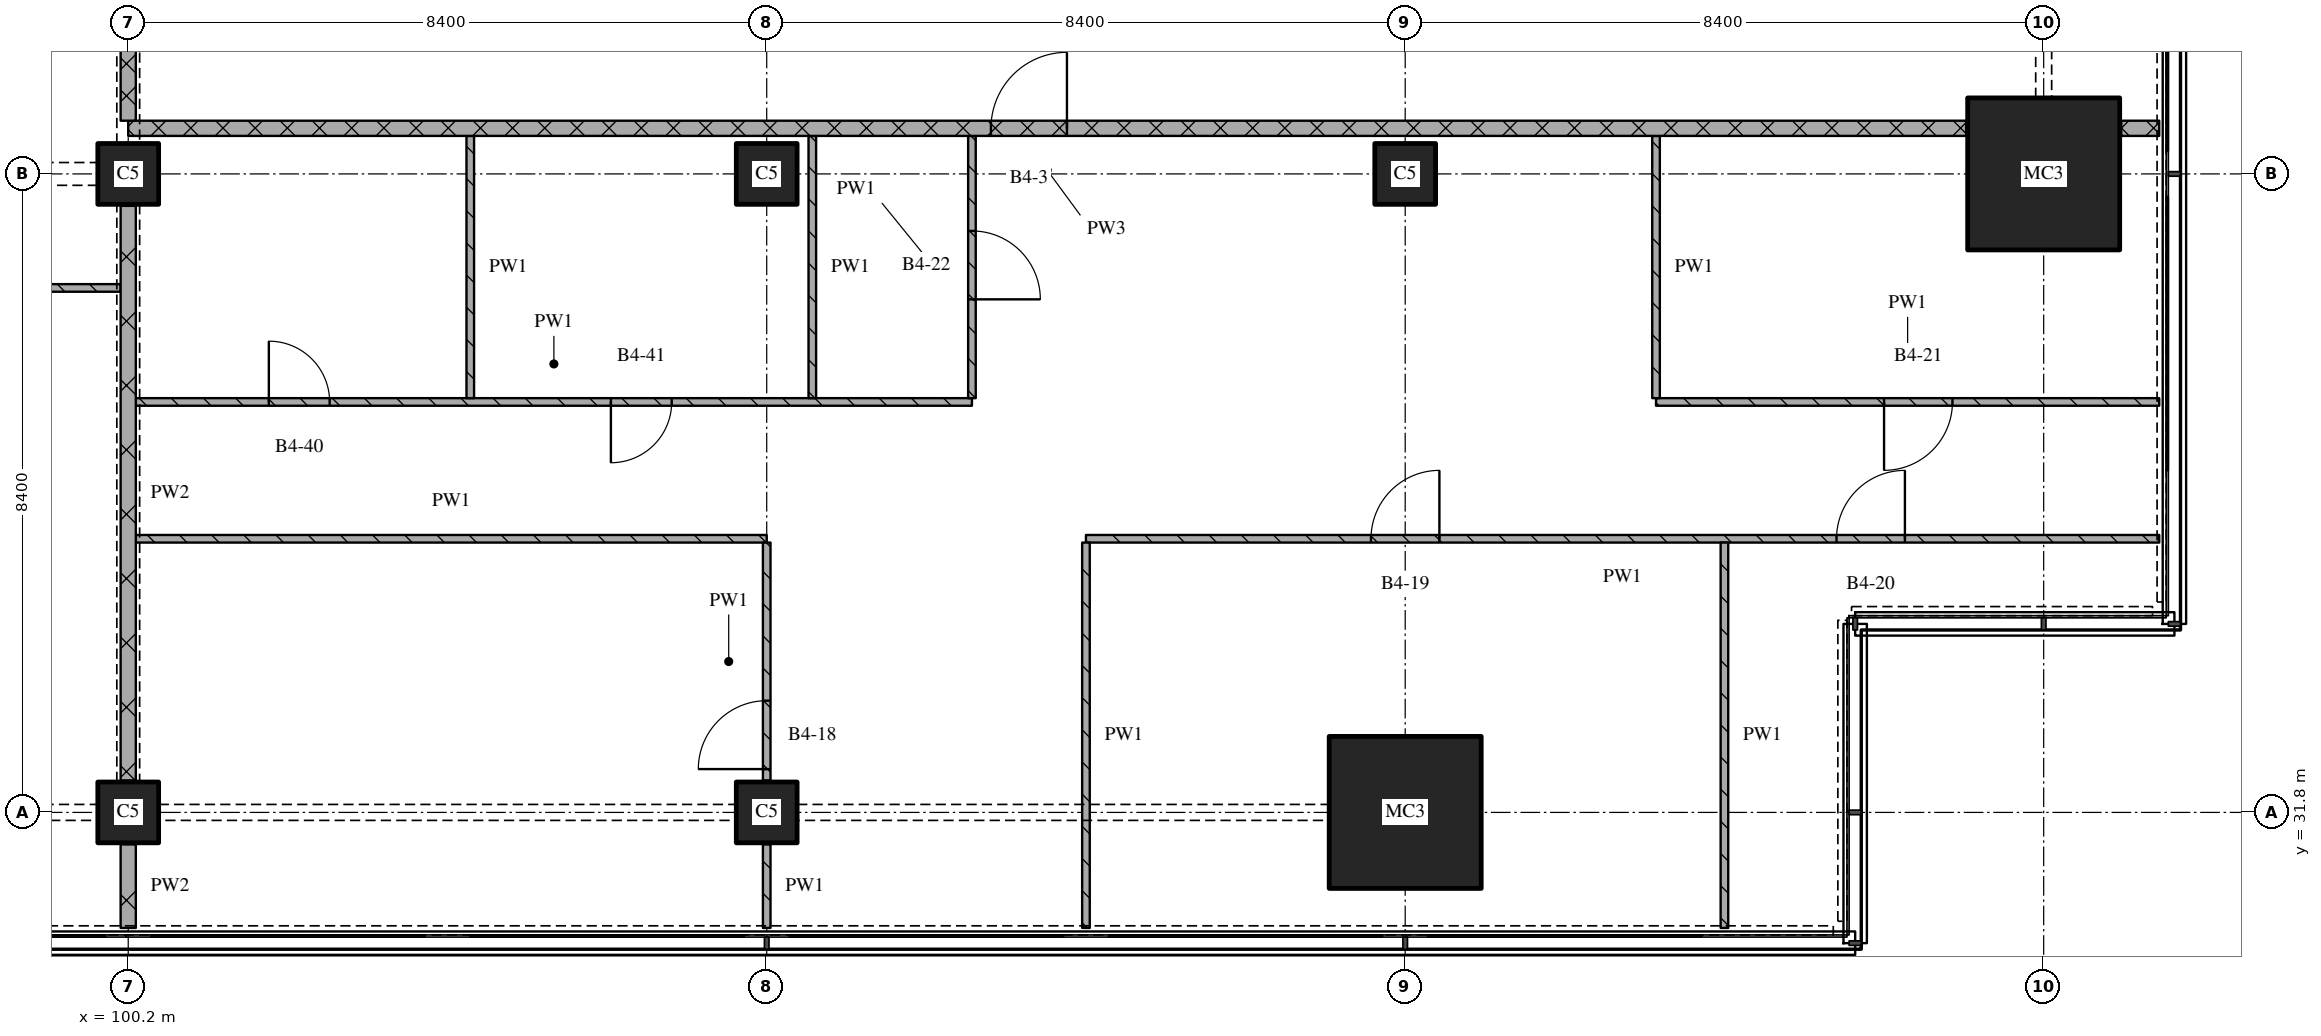
"""IFC4 building model, lengths in metres.
Left out: names, types, materials, properties, quantities, classifications, styles, units other than length and angle.
Written with IfcOpenShell. Run it as: python <this file> out.ifc"""

import sys

from ifc_helpers import new_model, si_unit, direction, frame, frame_2d, origin, origin_2d, place, context, subcontext, project, spatial, rectangle, extrude, element, fill, save


model = new_model("IFC4")
c1 = context("Model", 3, precision=1e-05, world=origin(), true_north=direction((0.0, 1.0)))
c2 = subcontext(c1, "Body", "Model", "MODEL_VIEW")
j1 = project(units=[si_unit("LENGTHUNIT", "METRE"), si_unit("PLANEANGLEUNIT", "RADIAN")], contexts=[c1])
p1 = place(None, origin())
s1 = spatial("IfcSite", under=j1, at=p1, CompositionType="ELEMENT")
p2 = place(p1, origin())
s2 = spatial("IfcBuilding", under=s1, at=p2, CompositionType="ELEMENT")
p3 = place(p2, frame((0.0, 0.0, 131.25)))
s3 = spatial("IfcBuildingStorey", under=s2, at=p3, CompositionType="ELEMENT", Elevation=131.25)
for number, where, z_axis, x_axis in (
    (1, (100.2, 31.8, 0.0), (0.0, 0.0, 1.0), (1.0, 0.0, 0.0)),
    (2, (100.2, 40.2, 0.0), (0.0, 0.0, 1.0), (1.0, 0.0, 0.0)),
    (3, (108.6, 31.8, 0.0), (0.0, 0.0, 1.0), (1.0, 0.0, 0.0)),
    (4, (108.6, 40.2, 0.0), (0.0, 0.0, 1.0), (1.0, 0.0, 0.0)),
):
    element("IfcColumn", number, at=place(p3, frame(where, z_axis=z_axis, x_axis=x_axis)), inside=s3, PredefinedType="COLUMN", context=c2, shape_type="SweptSolid", body=[
        extrude(rectangle(XDim=0.8, YDim=0.8, at=origin_2d()), origin(), (0.0, 0.0, 1.0), 3.6),
    ])
p4 = place(p3, frame((117.0, 31.8, 0.0), z_axis=(0.0, 0.0, 1.0), x_axis=(1.0, 0.0, 0.0)))
e5 = element("IfcColumn", 5, at=p4, inside=s3, PredefinedType="COLUMN", context=c2, shape_type="SweptSolid", body=[
    extrude(rectangle(XDim=2.0, YDim=2.0, at=origin_2d()), origin(), (0.0, 0.0, 1.0), 3.6),
])
p5 = place(p3, frame((117.0, 40.2, 0.0), z_axis=(0.0, 0.0, 1.0), x_axis=(1.0, 0.0, 0.0)))
e6 = element("IfcColumn", 6, at=p5, inside=s3, PredefinedType="COLUMN", context=c2, shape_type="SweptSolid", body=[
    extrude(rectangle(XDim=0.8, YDim=0.8, at=origin_2d()), origin(), (0.0, 0.0, 1.0), 3.6),
])
p6 = place(p3, frame((125.4, 40.2, 0.0), z_axis=(0.0, 0.0, 1.0), x_axis=(1.0, 0.0, 0.0)))
e7 = element("IfcColumn", 7, at=p6, inside=s3, PredefinedType="COLUMN", context=c2, shape_type="SweptSolid", body=[
    extrude(rectangle(XDim=2.0, YDim=2.0, at=origin_2d()), origin(), (0.0, 0.0, 1.0), 3.6),
])
p7 = place(p3, frame((100.3, 35.4, 0.0), z_axis=(0.0, 0.0, 1.0), x_axis=(1.0, 0.0, 0.0)))
e8 = element("IfcWall", 8, at=p7, inside=s3, PredefinedType="PARTITIONING", context=c2, shape_type="SweptSolid", body=[
    extrude(rectangle(XDim=8.3, YDim=0.1, at=frame_2d((4.15, 0.0))), origin(), (0.0, 0.0, 1.0), 3.32),
])
p8 = place(p3, frame((126.92, 35.4, 0.0), z_axis=(0.0, 0.0, 1.0), x_axis=(-1.0, 0.0, 0.0)))
e9 = element("IfcWall", 9, at=p8, inside=s3, PredefinedType="PARTITIONING", context=c2, shape_type="SweptSolid", body=[
    extrude(rectangle(XDim=14.12, YDim=0.1, at=frame_2d((7.06, 0.0))), origin(), (0.0, 0.0, 1.0), 3.32),
])
p9 = place(p8, frame((3.346, 0.0, 0.0)))
e10 = element("IfcOpeningElement", 10, at=p9, cuts=e9, PredefinedType="OPENING", context=c2, shape_type="SweptSolid", body=[
    extrude(rectangle(XDim=0.9, YDim=2.1, at=frame_2d((0.45, 1.05))), frame((0.0, 0.06, 0.0), z_axis=(0.0, -1.0, 0.0), x_axis=(1.0, 0.0, 0.0)), (0.0, 0.0, 1.0), 0.12),
])
p10 = place(p8, frame((9.47, 0.0, 0.0)))
e11 = element("IfcOpeningElement", 11, at=p10, cuts=e9, PredefinedType="OPENING", context=c2, shape_type="SweptSolid", body=[
    extrude(rectangle(XDim=0.9, YDim=2.1, at=frame_2d((0.45, 1.05))), frame((0.0, 0.06, 0.0), z_axis=(0.0, -1.0, 0.0), x_axis=(1.0, 0.0, 0.0)), (0.0, 0.0, 1.0), 0.12),
])
p11 = place(p3, frame((100.3, 37.2, 0.0), z_axis=(0.0, 0.0, 1.0), x_axis=(1.0, 0.0, 0.0)))
e12 = element("IfcWall", 12, at=p11, inside=s3, PredefinedType="PARTITIONING", context=c2, shape_type="SweptSolid", body=[
    extrude(rectangle(XDim=11.0, YDim=0.1, at=frame_2d((5.5, 0.0))), origin(), (0.0, 0.0, 1.0), 3.32),
])
p12 = place(p11, frame((1.75, 0.0, 0.0)))
e13 = element("IfcOpeningElement", 13, at=p12, cuts=e12, PredefinedType="OPENING", context=c2, shape_type="SweptSolid", body=[
    extrude(rectangle(XDim=0.8, YDim=2.1, at=frame_2d((0.4, 1.05))), frame((0.0, 0.06, 0.0), z_axis=(0.0, -1.0, 0.0), x_axis=(1.0, 0.0, 0.0)), (0.0, 0.0, 1.0), 0.12),
])
p13 = place(p11, frame((6.25, 0.0, 0.0)))
e14 = element("IfcOpeningElement", 14, at=p13, cuts=e12, PredefinedType="OPENING", context=c2, shape_type="SweptSolid", body=[
    extrude(rectangle(XDim=0.8, YDim=2.1, at=frame_2d((0.4, 1.05))), frame((0.0, 0.06, 0.0), z_axis=(0.0, -1.0, 0.0), x_axis=(1.0, 0.0, 0.0)), (0.0, 0.0, 1.0), 0.12),
])
p14 = place(p3, frame((120.3, 37.2, 0.0), z_axis=(0.0, 0.0, 1.0), x_axis=(1.0, 0.0, 0.0)))
e15 = element("IfcWall", 15, at=p14, inside=s3, PredefinedType="PARTITIONING", context=c2, shape_type="SweptSolid", body=[
    extrude(rectangle(XDim=6.62, YDim=0.1, at=frame_2d((3.31, 0.0))), origin(), (0.0, 0.0, 1.0), 3.32),
])
p15 = place(p14, frame((3.0, 0.0, 0.0)))
e16 = element("IfcOpeningElement", 16, at=p15, cuts=e15, PredefinedType="OPENING", context=c2, shape_type="SweptSolid", body=[
    extrude(rectangle(XDim=0.9, YDim=2.1, at=frame_2d((0.45, 1.05))), frame((0.0, 0.06, 0.0), z_axis=(0.0, -1.0, 0.0), x_axis=(1.0, 0.0, 0.0)), (0.0, 0.0, 1.0), 0.12),
])
p16 = place(p3, frame((91.2, 38.7, 0.0), z_axis=(0.0, 0.0, 1.0), x_axis=(1.0, 0.0, 0.0)))
e17 = element("IfcWall", 17, at=p16, inside=s3, PredefinedType="PARTITIONING", context=c2, shape_type="SweptSolid", body=[
    extrude(rectangle(XDim=8.9, YDim=0.1, at=frame_2d((4.45, 0.0))), origin(), (0.0, 0.0, 1.0), 3.32),
])
p17 = place(p16, frame((4.05, 0.0, 0.0)))
e18 = element("IfcOpeningElement", 18, at=p17, cuts=e17, PredefinedType="OPENING", context=c2, shape_type="SweptSolid", body=[
    extrude(rectangle(XDim=0.9, YDim=2.1, at=frame_2d((0.45, 1.05))), frame((0.0, 0.06, 0.0), z_axis=(0.0, -1.0, 0.0), x_axis=(1.0, 0.0, 0.0)), (0.0, 0.0, 1.0), 0.12),
])
p18 = place(p3, frame((124.38, 40.8, 0.0), z_axis=(0.0, 0.0, 1.0), x_axis=(-1.0, 0.0, 0.0)))
e19 = element("IfcWall", 19, at=p18, inside=s3, PredefinedType="PARTITIONING", context=c2, shape_type="SweptSolid", body=[
    extrude(rectangle(XDim=24.18, YDim=0.2, at=frame_2d((12.09, 0.0))), origin(), (0.0, 0.0, 1.0), 3.32),
])
p19 = place(p18, frame((11.83, 0.0, 0.0)))
e20 = element("IfcOpeningElement", 20, at=p19, cuts=e19, PredefinedType="OPENING", context=c2, shape_type="SweptSolid", body=[
    extrude(rectangle(XDim=1.0, YDim=2.1, at=frame_2d((0.5, 1.05))), frame((0.0, 0.11, 0.0), z_axis=(0.0, -1.0, 0.0), x_axis=(1.0, 0.0, 0.0)), (0.0, 0.0, 1.0), 0.22),
])
p20 = place(p3, frame((126.42, 40.8, 0.0), z_axis=(0.0, 0.0, 1.0), x_axis=(1.0, 0.0, 0.0)))
e21 = element("IfcWall", 21, at=p20, inside=s3, PredefinedType="PARTITIONING", context=c2, shape_type="SweptSolid", body=[
    extrude(rectangle(XDim=0.5, YDim=0.2, at=frame_2d((0.25, 0.0))), origin(), (0.0, 0.0, 1.0), 3.32),
])
p21 = place(p3, frame((100.2, 43.1, 0.0), z_axis=(0.0, 0.0, 1.0), x_axis=(0.0, -1.0, 0.0)))
e22 = element("IfcWall", 22, at=p21, inside=s3, PredefinedType="PARTITIONING", context=c2, shape_type="SweptSolid", body=[
    extrude(rectangle(XDim=2.2, YDim=0.2, at=frame_2d((1.1, 0.0))), origin(), (0.0, 0.0, 1.0), 2.43),
])
p22 = place(p3, frame((100.2, 31.38, 0.0), z_axis=(0.0, 0.0, 1.0), x_axis=(0.0, -1.0, 0.0)))
e23 = element("IfcWall", 23, at=p22, inside=s3, PredefinedType="PARTITIONING", context=c2, shape_type="SweptSolid", body=[
    extrude(rectangle(XDim=1.1, YDim=0.2, at=frame_2d((0.55, 0.0))), origin(), (0.0, 0.0, 1.0), 3.32),
])
p23 = place(p3, frame((100.2, 39.78, 0.0), z_axis=(0.0, 0.0, 1.0), x_axis=(0.0, -1.0, 0.0)))
e24 = element("IfcWall", 24, at=p23, inside=s3, PredefinedType="PARTITIONING", context=c2, shape_type="SweptSolid", body=[
    extrude(rectangle(XDim=7.56, YDim=0.2, at=frame_2d((3.78, 0.0))), origin(), (0.0, 0.0, 1.0), 2.83),
])
p24 = place(p3, frame((104.7, 40.7, 0.0), z_axis=(0.0, 0.0, 1.0), x_axis=(0.0, -1.0, 0.0)))
e25 = element("IfcWall", 25, at=p24, inside=s3, PredefinedType="PARTITIONING", context=c2, shape_type="SweptSolid", body=[
    extrude(rectangle(XDim=3.45, YDim=0.1, at=frame_2d((1.725, 0.0))), origin(), (0.0, 0.0, 1.0), 3.32),
])
p25 = place(p3, frame((108.6, 31.38, 0.0), z_axis=(0.0, 0.0, 1.0), x_axis=(0.0, -1.0, 0.0)))
e26 = element("IfcWall", 26, at=p25, inside=s3, PredefinedType="PARTITIONING", context=c2, shape_type="SweptSolid", body=[
    extrude(rectangle(XDim=1.1, YDim=0.1, at=frame_2d((0.55, 0.0))), origin(), (0.0, 0.0, 1.0), 3.32),
])
p26 = place(p3, frame((108.6, 32.22, 0.0), z_axis=(0.0, 0.0, 1.0), x_axis=(0.0, 1.0, 0.0)))
e27 = element("IfcWall", 27, at=p26, inside=s3, PredefinedType="PARTITIONING", context=c2, shape_type="SweptSolid", body=[
    extrude(rectangle(XDim=3.13, YDim=0.1, at=frame_2d((1.565, 0.0))), origin(), (0.0, 0.0, 1.0), 3.32),
])
p27 = place(p26, frame((0.15, 0.0, 0.0)))
e28 = element("IfcOpeningElement", 28, at=p27, cuts=e27, PredefinedType="OPENING", context=c2, shape_type="SweptSolid", body=[
    extrude(rectangle(XDim=0.9, YDim=2.1, at=frame_2d((0.45, 1.05))), frame((0.0, 0.06, 0.0), z_axis=(0.0, -1.0, 0.0), x_axis=(1.0, 0.0, 0.0)), (0.0, 0.0, 1.0), 0.12),
])
p28 = place(p3, frame((109.2, 40.7, 0.0), z_axis=(0.0, 0.0, 1.0), x_axis=(0.0, -1.0, 0.0)))
e29 = element("IfcWall", 29, at=p28, inside=s3, PredefinedType="PARTITIONING", context=c2, shape_type="SweptSolid", body=[
    extrude(rectangle(XDim=3.45, YDim=0.1, at=frame_2d((1.725, 0.0))), origin(), (0.0, 0.0, 1.0), 3.32),
])
p29 = place(p3, frame((111.3, 37.25, 0.0), z_axis=(0.0, 0.0, 1.0), x_axis=(0.0, 1.0, 0.0)))
e30 = element("IfcWall", 30, at=p29, inside=s3, PredefinedType="PARTITIONING", context=c2, shape_type="SweptSolid", body=[
    extrude(rectangle(XDim=3.45, YDim=0.1, at=frame_2d((1.725, 0.0))), origin(), (0.0, 0.0, 1.0), 3.32),
])
p30 = place(p29, frame((1.3, 0.0, 0.0)))
e31 = element("IfcOpeningElement", 31, at=p30, cuts=e30, PredefinedType="OPENING", context=c2, shape_type="SweptSolid", body=[
    extrude(rectangle(XDim=0.9, YDim=2.1, at=frame_2d((0.45, 1.05))), frame((0.0, 0.06, 0.0), z_axis=(0.0, -1.0, 0.0), x_axis=(1.0, 0.0, 0.0)), (0.0, 0.0, 1.0), 0.12),
])
p31 = place(p3, frame((112.8, 35.35, 0.0), z_axis=(0.0, 0.0, 1.0), x_axis=(0.0, -1.0, 0.0)))
e32 = element("IfcWall", 32, at=p31, inside=s3, PredefinedType="PARTITIONING", context=c2, shape_type="SweptSolid", body=[
    extrude(rectangle(XDim=5.07, YDim=0.1, at=frame_2d((2.535, 0.0))), origin(), (0.0, 0.0, 1.0), 3.32),
])
p32 = place(p3, frame((120.3, 40.7, 0.0), z_axis=(0.0, 0.0, 1.0), x_axis=(0.0, -1.0, 0.0)))
e33 = element("IfcWall", 33, at=p32, inside=s3, PredefinedType="PARTITIONING", context=c2, shape_type="SweptSolid", body=[
    extrude(rectangle(XDim=3.45, YDim=0.1, at=frame_2d((1.725, 0.0))), origin(), (0.0, 0.0, 1.0), 3.32),
])
p33 = place(p3, frame((121.2, 35.35, 0.0), z_axis=(0.0, 0.0, 1.0), x_axis=(0.0, -1.0, 0.0)))
e34 = element("IfcWall", 34, at=p33, inside=s3, PredefinedType="PARTITIONING", context=c2, shape_type="SweptSolid", body=[
    extrude(rectangle(XDim=5.07, YDim=0.1, at=frame_2d((2.535, 0.0))), origin(), (0.0, 0.0, 1.0), 3.32),
])
p34 = place(p9, origin())
e35 = element("IfcDoor", 35, at=p34, inside=s3, OperationType="SINGLE_SWING_RIGHT", PredefinedType="DOOR", context=c2, shape_type="SweptSolid", body=[
    extrude(rectangle(XDim=0.9, YDim=2.1, at=frame_2d((0.45, 1.05))), frame((0.0, 0.025, 0.0), z_axis=(0.0, -1.0, 0.0), x_axis=(1.0, 0.0, 0.0)), (0.0, 0.0, 1.0), 0.05),
])
fill(e10, e35)
p35 = place(p10, origin())
e36 = element("IfcDoor", 36, at=p35, inside=s3, OperationType="SINGLE_SWING_RIGHT", PredefinedType="DOOR", context=c2, shape_type="SweptSolid", body=[
    extrude(rectangle(XDim=0.9, YDim=2.1, at=frame_2d((0.45, 1.05))), frame((0.0, 0.025, 0.0), z_axis=(0.0, -1.0, 0.0), x_axis=(1.0, 0.0, 0.0)), (0.0, 0.0, 1.0), 0.05),
])
fill(e11, e36)
p36 = place(p12, origin())
e37 = element("IfcDoor", 37, at=p36, inside=s3, OperationType="SINGLE_SWING_LEFT", PredefinedType="DOOR", context=c2, shape_type="SweptSolid", body=[
    extrude(rectangle(XDim=0.8, YDim=2.1, at=frame_2d((0.4, 1.05))), frame((0.0, 0.025, 0.0), z_axis=(0.0, -1.0, 0.0), x_axis=(1.0, 0.0, 0.0)), (0.0, 0.0, 1.0), 0.05),
])
fill(e13, e37)
p37 = place(p13, origin())
e38 = element("IfcDoor", 38, at=p37, inside=s3, OperationType="SINGLE_SWING_RIGHT", PredefinedType="DOOR", context=c2, shape_type="SweptSolid", body=[
    extrude(rectangle(XDim=0.8, YDim=2.1, at=frame_2d((0.4, 1.05))), frame((0.0, 0.025, 0.0), z_axis=(0.0, -1.0, 0.0), x_axis=(1.0, 0.0, 0.0)), (0.0, 0.0, 1.0), 0.05),
])
fill(e14, e38)
p38 = place(p15, origin())
e39 = element("IfcDoor", 39, at=p38, inside=s3, OperationType="SINGLE_SWING_RIGHT", PredefinedType="DOOR", context=c2, shape_type="SweptSolid", body=[
    extrude(rectangle(XDim=0.9, YDim=2.1, at=frame_2d((0.45, 1.05))), frame((0.0, 0.025, 0.0), z_axis=(0.0, -1.0, 0.0), x_axis=(1.0, 0.0, 0.0)), (0.0, 0.0, 1.0), 0.05),
])
fill(e16, e39)
p39 = place(p19, origin())
e40 = element("IfcDoor", 40, at=p39, inside=s3, OperationType="SINGLE_SWING_RIGHT", PredefinedType="DOOR", context=c2, shape_type="SweptSolid", body=[
    extrude(rectangle(XDim=1.0, YDim=2.1, at=frame_2d((0.5, 1.05))), frame((0.0, 0.025, 0.0), z_axis=(0.0, -1.0, 0.0), x_axis=(1.0, 0.0, 0.0)), (0.0, 0.0, 1.0), 0.05),
])
fill(e20, e40)
p40 = place(p27, origin())
e41 = element("IfcDoor", 41, at=p40, inside=s3, OperationType="SINGLE_SWING_LEFT", PredefinedType="DOOR", context=c2, shape_type="SweptSolid", body=[
    extrude(rectangle(XDim=0.9, YDim=2.1, at=frame_2d((0.45, 1.05))), frame((0.0, 0.025, 0.0), z_axis=(0.0, -1.0, 0.0), x_axis=(1.0, 0.0, 0.0)), (0.0, 0.0, 1.0), 0.05),
])
fill(e28, e41)
p41 = place(p30, origin())
e42 = element("IfcDoor", 42, at=p41, inside=s3, OperationType="SINGLE_SWING_RIGHT", PredefinedType="DOOR", context=c2, shape_type="SweptSolid", body=[
    extrude(rectangle(XDim=0.9, YDim=2.1, at=frame_2d((0.45, 1.05))), frame((0.0, 0.025, 0.0), z_axis=(0.0, -1.0, 0.0), x_axis=(1.0, 0.0, 0.0)), (0.0, 0.0, 1.0), 0.05),
])
fill(e31, e42)
save(model, sys.argv[1])
